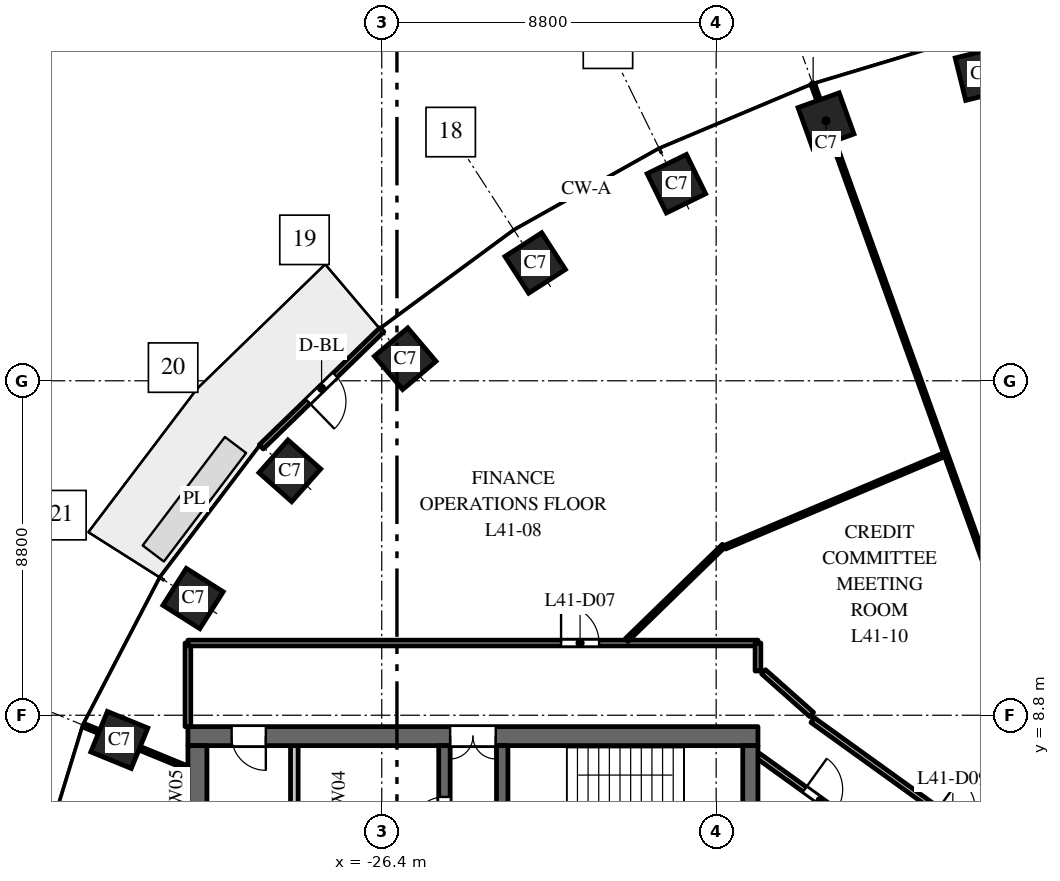
"""IFC4 building model, lengths in metres.
Left out: names, types, materials, properties, quantities, classifications, styles, units other than length and angle.
Written with IfcOpenShell. Run it as: python <this file> out.ifc"""

import sys

from ifc_helpers import new_model, si_unit, direction, frame, frame_2d, origin, origin_2d, place, context, subcontext, project, spatial, rectangle, extrude, element, fill, save


model = new_model("IFC4")
c1 = context("Model", 3, precision=1e-05, world=origin(), true_north=direction((0.0, 1.0)))
c2 = subcontext(c1, "Body", "Model", "MODEL_VIEW")
j1 = project(units=[si_unit("LENGTHUNIT", "METRE"), si_unit("PLANEANGLEUNIT", "RADIAN")], contexts=[c1])
p1 = place(None, origin())
s1 = spatial("IfcSite", under=j1, at=p1, CompositionType="ELEMENT")
p2 = place(p1, origin())
s2 = spatial("IfcBuilding", under=s1, at=p2, CompositionType="ELEMENT")
p3 = place(p2, frame((0.0, 0.0, 178.0)))
s3 = spatial("IfcBuildingStorey", under=s2, at=p3, CompositionType="ELEMENT", Elevation=178.0)
for number, where, z_axis, x_axis in (
    (1, (-10.613, 25.674, 0.0), (0.0, 0.0, 1.0), (-0.971, -0.24, 0.0)),
    (2, (-14.709, 24.441, 0.0), (0.0, 0.0, 1.0), (-0.941, -0.338, 0.0)),
    (3, (-18.646, 22.785, 0.0), (0.0, 0.0, 1.0), (-0.898, -0.439, 0.0)),
    (4, (-22.362, 20.7, 0.0), (0.0, 0.0, 1.0), (-0.84, -0.542, 0.0)),
    (5, (-25.783, 18.18, 0.0), (0.0, 0.0, 1.0), (-0.763, -0.646, 0.0)),
    (6, (-28.819, 15.23, 0.0), (0.0, 0.0, 1.0), (-0.663, -0.749, 0.0)),
    (7, (-31.365, 11.871, 0.0), (0.0, 0.0, 1.0), (-0.535, -0.845, 0.0)),
    (8, (-33.305, 8.149, 0.0), (0.0, 0.0, 1.0), (-0.379, -0.925, 0.0)),
):
    element("IfcColumn", number, at=place(p3, frame(where, z_axis=z_axis, x_axis=x_axis)), inside=s3, PredefinedType="COLUMN", context=c2, shape_type="SweptSolid", body=[
        extrude(rectangle(XDim=1.15, YDim=1.15, at=origin_2d()), origin(), (0.0, 0.0, 1.0), 4.0),
    ])
p4 = place(p3, frame((-16.5, 8.25, 0.0), z_axis=(0.0, 0.0, 1.0), x_axis=(-1.0, 0.0, 0.0)))
e9 = element("IfcWall", 9, at=p4, inside=s3, PredefinedType="SHEAR", context=c2, shape_type="SweptSolid", body=[
    extrude(rectangle(XDim=15.0, YDim=0.5, at=frame_2d((7.5, 0.0))), origin(), (0.0, 0.0, 1.0), 3.7),
])
p5 = place(p4, frame((6.9, 0.0, 0.0)))
e10 = element("IfcOpeningElement", 10, at=p5, cuts=e9, PredefinedType="OPENING", context=c2, shape_type="SweptSolid", body=[
    extrude(rectangle(XDim=1.2, YDim=2.1, at=frame_2d((0.6, 1.05))), frame((0.0, 0.26, 0.0), z_axis=(0.0, -1.0, 0.0), x_axis=(1.0, 0.0, 0.0)), (0.0, 0.0, 1.0), 0.52),
])
p6 = place(p4, frame((12.95, 0.0, 0.0)))
e11 = element("IfcOpeningElement", 11, at=p6, cuts=e9, PredefinedType="OPENING", context=c2, shape_type="SweptSolid", body=[
    extrude(rectangle(XDim=0.9, YDim=2.1, at=frame_2d((0.45, 1.05))), frame((0.0, 0.26, 0.0), z_axis=(0.0, -1.0, 0.0), x_axis=(1.0, 0.0, 0.0)), (0.0, 0.0, 1.0), 0.52),
])
p7 = place(p3, frame((-24.75, -8.0, 0.0), z_axis=(0.0, 0.0, 1.0), x_axis=(0.0, 1.0, 0.0)))
e12 = element("IfcWall", 12, at=p7, inside=s3, PredefinedType="SHEAR", context=c2, shape_type="SweptSolid", body=[
    extrude(rectangle(XDim=16.0, YDim=0.3, at=frame_2d((8.0, 0.0))), origin(), (0.0, 0.0, 1.0), 3.7),
])
p8 = place(p7, frame((4.425, 0.0, 0.0)))
e13 = element("IfcOpeningElement", 13, at=p8, cuts=e12, PredefinedType="OPENING", context=c2, shape_type="SweptSolid", body=[
    extrude(rectangle(XDim=1.1, YDim=2.1, at=frame_2d((0.55, 1.05))), frame((0.0, 0.16, 0.0), z_axis=(0.0, -1.0, 0.0), x_axis=(1.0, 0.0, 0.0)), (0.0, 0.0, 1.0), 0.32),
])
p9 = place(p7, frame((7.45, 0.0, 0.0)))
e14 = element("IfcOpeningElement", 14, at=p9, cuts=e12, PredefinedType="OPENING", context=c2, shape_type="SweptSolid", body=[
    extrude(rectangle(XDim=1.1, YDim=2.1, at=frame_2d((0.55, 1.05))), frame((0.0, 0.16, 0.0), z_axis=(0.0, -1.0, 0.0), x_axis=(1.0, 0.0, 0.0)), (0.0, 0.0, 1.0), 0.32),
])
p10 = place(p7, frame((10.475, 0.0, 0.0)))
e15 = element("IfcOpeningElement", 15, at=p10, cuts=e12, PredefinedType="OPENING", context=c2, shape_type="SweptSolid", body=[
    extrude(rectangle(XDim=1.1, YDim=2.1, at=frame_2d((0.55, 1.05))), frame((0.0, 0.16, 0.0), z_axis=(0.0, -1.0, 0.0), x_axis=(1.0, 0.0, 0.0)), (0.0, 0.0, 1.0), 0.32),
])
p11 = place(p7, frame((13.75, 0.0, 0.0)))
e16 = element("IfcOpeningElement", 16, at=p11, cuts=e12, PredefinedType="OPENING", context=c2, shape_type="SweptSolid", body=[
    extrude(rectangle(XDim=0.9, YDim=2.1, at=frame_2d((0.45, 1.05))), frame((0.0, 0.16, 0.0), z_axis=(0.0, -1.0, 0.0), x_axis=(1.0, 0.0, 0.0)), (0.0, 0.0, 1.0), 0.32),
])
p12 = place(p7, frame((1.35, 0.0, 0.0)))
e17 = element("IfcOpeningElement", 17, at=p12, cuts=e12, PredefinedType="OPENING", context=c2, shape_type="SweptSolid", body=[
    extrude(rectangle(XDim=0.9, YDim=2.1, at=frame_2d((0.45, 1.05))), frame((0.0, 0.16, 0.0), z_axis=(0.0, -1.0, 0.0), x_axis=(1.0, 0.0, 0.0)), (0.0, 0.0, 1.0), 0.32),
])
p13 = place(p3, frame((-16.7, -8.0, 0.0), z_axis=(0.0, 0.0, 1.0), x_axis=(0.0, 1.0, 0.0)))
e18 = element("IfcWall", 18, at=p13, inside=s3, PredefinedType="SHEAR", context=c2, shape_type="SweptSolid", body=[
    extrude(rectangle(XDim=16.0, YDim=0.4, at=frame_2d((8.0, 0.0))), origin(), (0.0, 0.0, 1.0), 3.7),
])
p14 = place(p3, frame((-31.25, -8.0, 0.0), z_axis=(0.0, 0.0, 1.0), x_axis=(0.0, 1.0, 0.0)))
e19 = element("IfcWall", 19, at=p14, inside=s3, PredefinedType="SHEAR", context=c2, shape_type="SweptSolid", body=[
    extrude(rectangle(XDim=16.0, YDim=0.5, at=frame_2d((8.0, 0.0))), origin(), (0.0, 0.0, 1.0), 3.7),
])
p15 = place(p3, frame((-28.7, 4.75, 0.0), z_axis=(0.0, 0.0, 1.0), x_axis=(0.0, 1.0, 0.0)))
e20 = element("IfcWall", 20, at=p15, inside=s3, PredefinedType="PARTITIONING", context=c2, shape_type="SweptSolid", body=[
    extrude(rectangle(XDim=3.25, YDim=0.2, at=frame_2d((1.625, 0.0))), origin(), (0.0, 0.0, 1.0), 3.7),
])
p16 = place(p3, frame((-23.23, 2.25, 0.0), z_axis=(0.0, 0.0, 1.0), x_axis=(0.0, 1.0, 0.0)))
e21 = element("IfcWall", 21, at=p16, inside=s3, PredefinedType="SHEAR", context=c2, shape_type="SweptSolid", body=[
    extrude(rectangle(XDim=5.75, YDim=0.3, at=frame_2d((2.875, 0.0))), origin(), (0.0, 0.0, 1.0), 3.7),
])
p17 = place(p16, frame((0.6, 0.0, 0.0)))
e22 = element("IfcOpeningElement", 22, at=p17, cuts=e21, PredefinedType="OPENING", context=c2, shape_type="SweptSolid", body=[
    extrude(rectangle(XDim=1.0, YDim=2.1, at=frame_2d((0.5, 1.05))), frame((0.0, 0.16, 0.0), z_axis=(0.0, -1.0, 0.0), x_axis=(1.0, 0.0, 0.0)), (0.0, 0.0, 1.0), 0.32),
])
p18 = place(p3, frame((-26.396, 18.943, 0.0), z_axis=(0.0, 0.0, 1.0), x_axis=(-0.717214761864, -0.696852197647, 0.0)))
e23 = element("IfcWall", 23, at=p18, inside=s3, PredefinedType="STANDARD", context=c2, shape_type="SweptSolid", body=[
    extrude(rectangle(XDim=4.424, YDim=0.15, at=frame_2d((2.212, 0.0))), origin(), (0.0, 0.0, 1.0), 3.7),
])
p19 = place(p18, frame((1.712, 0.0, 0.0)))
e24 = element("IfcOpeningElement", 24, at=p19, cuts=e23, PredefinedType="OPENING", context=c2, shape_type="SweptSolid", body=[
    extrude(rectangle(XDim=1.0, YDim=2.4, at=frame_2d((0.5, 1.2))), frame((0.0, 0.085, 0.0), z_axis=(0.0, -1.0, 0.0), x_axis=(1.0, 0.0, 0.0)), (0.0, 0.0, 1.0), 0.17),
])
p20 = place(p3, frame((-34.234, 8.53, 0.0), z_axis=(0.0, 0.0, 1.0), x_axis=(0.925344112436, -0.379128307542, 0.0)))
e25 = element("IfcWall", 25, at=p20, inside=s3, PredefinedType="PARTITIONING", context=c2, shape_type="SweptSolid", body=[
    extrude(rectangle(XDim=2.954, YDim=0.1, at=frame_2d((1.477, 0.0))), origin(), (0.0, 0.0, 1.0), 2.9),
])
p21 = place(p3, frame((-31.5, 8.5, 0.0), z_axis=(0.0, 0.0, 1.0), x_axis=(0.0, 1.0, 0.0)))
e26 = element("IfcWall", 26, at=p21, inside=s3, PredefinedType="PARTITIONING", context=c2, shape_type="SweptSolid", body=[
    extrude(rectangle(XDim=2.2, YDim=0.15, at=frame_2d((1.1, 0.0))), origin(), (0.0, 0.0, 1.0), 3.7),
])
p22 = place(p3, frame((-31.5, 10.7, 0.0), z_axis=(0.0, 0.0, 1.0), x_axis=(1.0, 0.0, 0.0)))
e27 = element("IfcWall", 27, at=p22, inside=s3, PredefinedType="PARTITIONING", context=c2, shape_type="SweptSolid", body=[
    extrude(rectangle(XDim=15.0, YDim=0.15, at=frame_2d((7.5, 0.0))), origin(), (0.0, 0.0, 1.0), 3.1),
])
p23 = place(p22, frame((9.819, 0.0, 0.0)))
e28 = element("IfcOpeningElement", 28, at=p23, cuts=e27, PredefinedType="OPENING", context=c2, shape_type="SweptSolid", body=[
    extrude(rectangle(XDim=1.0, YDim=2.1, at=frame_2d((0.5, 1.05))), frame((0.0, 0.085, 0.0), z_axis=(0.0, -1.0, 0.0), x_axis=(1.0, 0.0, 0.0)), (0.0, 0.0, 1.0), 0.17),
])
p24 = place(p3, frame((-19.957, 10.778, 0.0), z_axis=(0.0, 0.0, 1.0), x_axis=(0.717304806733, 0.696759509614, 0.0)))
e29 = element("IfcWall", 29, at=p24, inside=s3, PredefinedType="PARTITIONING", context=c2, shape_type="SweptSolid", body=[
    extrude(rectangle(XDim=3.565, YDim=0.1, at=frame_2d((1.782, 0.0))), origin(), (0.0, 0.0, 1.0), 2.75),
])
p25 = place(p3, frame((-17.372, 13.219, 0.0), z_axis=(0.0, 0.0, 1.0), x_axis=(0.921428289763, 0.38854846136, 0.0)))
e30 = element("IfcWall", 30, at=p25, inside=s3, PredefinedType="PARTITIONING", context=c2, shape_type="SweptSolid", body=[
    extrude(rectangle(XDim=6.262, YDim=0.1, at=frame_2d((3.131, 0.0))), origin(), (0.0, 0.0, 1.0), 2.85),
])
p26 = place(p3, frame((-16.5, 9.964, 0.0), z_axis=(0.0, 0.0, 1.0), x_axis=(0.0, 1.0, 0.0)))
e31 = element("IfcWall", 31, at=p26, inside=s3, PredefinedType="PARTITIONING", context=c2, shape_type="SweptSolid", body=[
    extrude(rectangle(XDim=0.736, YDim=0.15, at=frame_2d((0.368, 0.0))), origin(), (0.0, 0.0, 1.0), 3.7),
])
p27 = place(p3, frame((-16.5, 7.735, 0.0), z_axis=(0.0, 0.0, 1.0), x_axis=(0.811616692984, -0.584190331715, 0.0)))
e32 = element("IfcWall", 32, at=p27, inside=s3, PredefinedType="PARTITIONING", context=c2, shape_type="SweptSolid", body=[
    extrude(rectangle(XDim=6.578, YDim=0.15, at=frame_2d((3.289, 0.0))), origin(), (0.0, 0.0, 1.0), 3.7),
])
p28 = place(p27, frame((1.515, 0.0, 0.0)))
e33 = element("IfcOpeningElement", 33, at=p28, cuts=e32, PredefinedType="OPENING", context=c2, shape_type="SweptSolid", body=[
    extrude(rectangle(XDim=1.0, YDim=2.1, at=frame_2d((0.5, 1.05))), frame((0.0, 0.085, 0.0), z_axis=(0.0, -1.0, 0.0), x_axis=(1.0, 0.0, 0.0)), (0.0, 0.0, 1.0), 0.17),
])
p29 = place(p3, frame((-15.061, 8.671, 0.0), z_axis=(0.0, 0.0, 1.0), x_axis=(0.811697765448, -0.584077681106, 0.0)))
e34 = element("IfcWall", 34, at=p29, inside=s3, PredefinedType="PARTITIONING", context=c2, shape_type="SweptSolid", body=[
    extrude(rectangle(XDim=5.694, YDim=0.15, at=frame_2d((2.847, 0.0))), origin(), (0.0, 0.0, 1.0), 3.7),
])
p30 = place(p29, frame((4.044, 0.0, 0.0)))
e35 = element("IfcOpeningElement", 35, at=p30, cuts=e34, PredefinedType="OPENING", context=c2, shape_type="SweptSolid", body=[
    extrude(rectangle(XDim=1.0, YDim=2.1, at=frame_2d((0.5, 1.05))), frame((0.0, 0.085, 0.0), z_axis=(0.0, -1.0, 0.0), x_axis=(1.0, 0.0, 0.0)), (0.0, 0.0, 1.0), 0.17),
])
p31 = place(p3, frame((-15.048, 25.383, 0.0), z_axis=(0.0, 0.0, 1.0), x_axis=(0.33832146485, -0.941030598026, 0.0)))
e36 = element("IfcWall", 36, at=p31, inside=s3, PredefinedType="PARTITIONING", context=c2, shape_type="SweptSolid", body=[
    extrude(rectangle(XDim=18.964, YDim=0.1, at=frame_2d((9.482, 0.0))), origin(), (0.0, 0.0, 1.0), 2.85),
])
p32 = place(p3, frame((-16.352, 9.942, 0.0), z_axis=(0.0, 0.0, 1.0), x_axis=(0.747926695066, -0.663781333579, 0.0)))
e37 = element("IfcWall", 37, at=p32, inside=s3, PredefinedType="PARTITIONING", context=c2, shape_type="SweptSolid", body=[
    extrude(rectangle(XDim=1.691, YDim=0.15, at=frame_2d((0.846, 0.0))), origin(), (0.0, 0.0, 1.0), 3.7),
])
p33 = place(p5, origin())
e38 = element("IfcDoor", 38, at=p33, inside=s3, OperationType="DOUBLE_DOOR_DOUBLE_SWING", PredefinedType="DOOR", context=c2, shape_type="SweptSolid", body=[
    extrude(rectangle(XDim=1.2, YDim=2.1, at=frame_2d((0.6, 1.05))), frame((0.0, 0.025, 0.0), z_axis=(0.0, -1.0, 0.0), x_axis=(1.0, 0.0, 0.0)), (0.0, 0.0, 1.0), 0.05),
])
fill(e10, e38)
p34 = place(p11, origin())
e39 = element("IfcDoor", 39, at=p34, inside=s3, OperationType="SINGLE_SWING_RIGHT", PredefinedType="DOOR", context=c2, shape_type="SweptSolid", body=[
    extrude(rectangle(XDim=0.9, YDim=2.1, at=frame_2d((0.45, 1.05))), frame((0.0, 0.025, 0.0), z_axis=(0.0, -1.0, 0.0), x_axis=(1.0, 0.0, 0.0)), (0.0, 0.0, 1.0), 0.05),
])
fill(e16, e39)
p35 = place(p6, origin())
e40 = element("IfcDoor", 40, at=p35, inside=s3, OperationType="SINGLE_SWING_RIGHT", PredefinedType="DOOR", context=c2, shape_type="SweptSolid", body=[
    extrude(rectangle(XDim=0.9, YDim=2.1, at=frame_2d((0.45, 1.05))), frame((0.0, 0.025, 0.0), z_axis=(0.0, -1.0, 0.0), x_axis=(1.0, 0.0, 0.0)), (0.0, 0.0, 1.0), 0.05),
])
fill(e11, e40)
p36 = place(p19, origin())
e41 = element("IfcDoor", 41, at=p36, inside=s3, OperationType="SINGLE_SWING_RIGHT", PredefinedType="DOOR", context=c2, shape_type="SweptSolid", body=[
    extrude(rectangle(XDim=1.0, YDim=2.4, at=frame_2d((0.5, 1.2))), frame((0.0, 0.025, 0.0), z_axis=(0.0, -1.0, 0.0), x_axis=(1.0, 0.0, 0.0)), (0.0, 0.0, 1.0), 0.05),
])
fill(e24, e41)
p37 = place(p23, origin())
e42 = element("IfcDoor", 42, at=p37, inside=s3, OperationType="SINGLE_SWING_LEFT", PredefinedType="DOOR", context=c2, shape_type="SweptSolid", body=[
    extrude(rectangle(XDim=1.0, YDim=2.1, at=frame_2d((0.5, 1.05))), frame((0.0, 0.025, 0.0), z_axis=(0.0, -1.0, 0.0), x_axis=(1.0, 0.0, 0.0)), (0.0, 0.0, 1.0), 0.05),
])
fill(e28, e42)
p38 = place(p28, origin())
e43 = element("IfcDoor", 43, at=p38, inside=s3, OperationType="SINGLE_SWING_LEFT", PredefinedType="DOOR", context=c2, shape_type="SweptSolid", body=[
    extrude(rectangle(XDim=1.0, YDim=2.1, at=frame_2d((0.5, 1.05))), frame((0.0, 0.025, 0.0), z_axis=(0.0, -1.0, 0.0), x_axis=(1.0, 0.0, 0.0)), (0.0, 0.0, 1.0), 0.05),
])
fill(e33, e43)
save(model, sys.argv[1])
